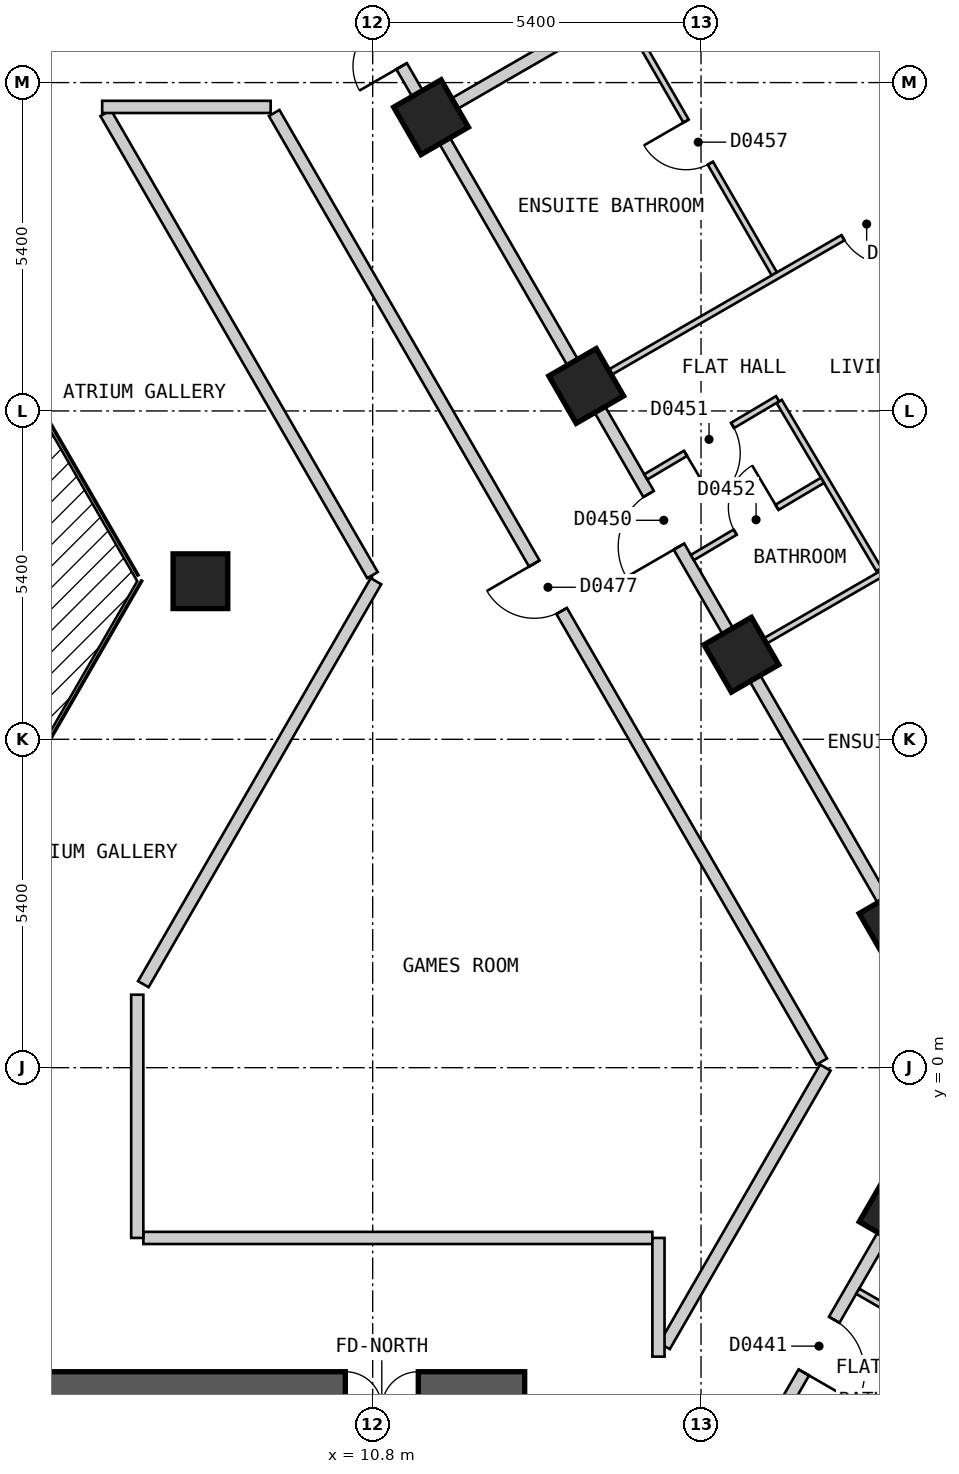
"""IFC4 building model, lengths in metres.
Left out: names, types, materials, properties, quantities, classifications, styles, units other than length and angle.
Written with IfcOpenShell. Run it as: python <this file> out.ifc"""

import sys

from ifc_helpers import new_model, si_unit, direction, frame, frame_2d, origin, origin_2d, place, context, subcontext, project, spatial, polyline, rectangle, outline, extrude, element, fill, save


model = new_model("IFC4")
c1 = context("Model", 3, precision=1e-05, world=origin(), true_north=direction((0.0, 1.0)))
c2 = subcontext(c1, "Body", "Model", "MODEL_VIEW")
j1 = project(units=[si_unit("LENGTHUNIT", "METRE"), si_unit("PLANEANGLEUNIT", "RADIAN")], contexts=[c1])
p1 = place(None, origin())
s1 = spatial("IfcSite", under=j1, at=p1, CompositionType="ELEMENT")
p2 = place(p1, origin())
s2 = spatial("IfcBuilding", under=s1, at=p2, CompositionType="ELEMENT")
p3 = place(p2, frame((0.0, 0.0, 26.4)))
s3 = spatial("IfcBuildingStorey", under=s2, at=p3, CompositionType="ELEMENT", Elevation=26.4)
for number, where, z_axis, x_axis in (
    (1, (19.417, -2.369, 0.0), (0.0, 0.0, 1.0), (0.5, 0.866, 0.0)),
    (2, (19.416, 2.371, 0.0), (0.0, 0.0, 1.0), (-0.5, 0.866, 0.0)),
    (3, (16.864, 6.791, 0.0), (0.0, 0.0, 1.0), (-0.5, 0.866, 0.0)),
    (4, (14.312, 11.211, 0.0), (0.0, 0.0, 1.0), (-0.5, 0.866, 0.0)),
    (5, (7.967, 8.0, 0.0), (0.0, 0.0, 1.0), (1.0, 0.0, 0.0)),
    (6, (11.76, 15.631, 0.0), (0.0, 0.0, 1.0), (-0.5, 0.866, 0.0)),
):
    element("IfcColumn", number, at=place(p3, frame(where, z_axis=z_axis, x_axis=x_axis)), inside=s3, PredefinedType="COLUMN", context=c2, shape_type="SweptSolid", body=[
        extrude(rectangle(XDim=0.9, YDim=0.9, at=origin_2d()), origin(), (0.0, 0.0, 1.0), 3.0),
    ])
p4 = place(p3, frame((-13.3, -5.6, 0.0), z_axis=(0.0, 0.0, 1.0), x_axis=(1.0, 0.0, 0.0)))
e7 = element("IfcWall", 7, at=p4, inside=s3, PredefinedType="SHEAR", context=c2, shape_type="SweptSolid", body=[
    extrude(rectangle(XDim=26.6, YDim=1.2, at=frame_2d((13.3, 0.0))), origin(), (0.0, 0.0, 1.0), 2.7),
])
p5 = place(p4, frame((23.65, 0.0, 0.0)))
e8 = element("IfcOpeningElement", 8, at=p5, cuts=e7, PredefinedType="OPENING", context=c2, shape_type="SweptSolid", body=[
    extrude(rectangle(XDim=1.2, YDim=2.1, at=frame_2d((0.6, 1.05))), frame((0.0, 0.61, 0.0), z_axis=(0.0, -1.0, 0.0), x_axis=(1.0, 0.0, 0.0)), (0.0, 0.0, 1.0), 1.22),
])
p6 = place(p3, frame((17.71, -25.825, 0.0), z_axis=(0.0, 0.0, 1.0), x_axis=(0.500001938803, 0.866024284413, 0.0)))
e9 = element("IfcWall", 9, at=p6, inside=s3, PredefinedType="SOLIDWALL", context=c2, shape_type="SweptSolid", body=[
    extrude(outline(polyline([(0.0, -0.15), (27.02, -0.15), (26.94, 0.15), (0.08, 0.15), (0.0, -0.15)])), origin(), (0.0, 0.0, 1.0), 2.7),
])
p7 = place(p6, frame((2.553, 0.0, 0.15)))
e10 = element("IfcOpeningElement", 10, at=p7, cuts=e9, PredefinedType="OPENING", context=c2, shape_type="SweptSolid", body=[
    extrude(rectangle(XDim=1.5, YDim=2.1, at=frame_2d((0.75, 1.05))), frame((0.0, 0.16, 0.0), z_axis=(0.0, -1.0, 0.0), x_axis=(1.0, 0.0, 0.0)), (0.0, 0.0, 1.0), 0.32),
])
p8 = place(p6, frame((7.658, 0.0, 0.15)))
e11 = element("IfcOpeningElement", 11, at=p8, cuts=e9, PredefinedType="OPENING", context=c2, shape_type="SweptSolid", body=[
    extrude(rectangle(XDim=1.5, YDim=2.1, at=frame_2d((0.75, 1.05))), frame((0.0, 0.16, 0.0), z_axis=(0.0, -1.0, 0.0), x_axis=(1.0, 0.0, 0.0)), (0.0, 0.0, 1.0), 0.32),
])
p9 = place(p6, frame((12.761, 0.0, 0.15)))
e12 = element("IfcOpeningElement", 12, at=p9, cuts=e9, PredefinedType="OPENING", context=c2, shape_type="SweptSolid", body=[
    extrude(rectangle(XDim=1.5, YDim=2.1, at=frame_2d((0.75, 1.05))), frame((0.0, 0.16, 0.0), z_axis=(0.0, -1.0, 0.0), x_axis=(1.0, 0.0, 0.0)), (0.0, 0.0, 1.0), 0.32),
])
p10 = place(p6, frame((17.865, 0.0, 0.15)))
e13 = element("IfcOpeningElement", 13, at=p10, cuts=e9, PredefinedType="OPENING", context=c2, shape_type="SweptSolid", body=[
    extrude(rectangle(XDim=1.5, YDim=2.1, at=frame_2d((0.75, 1.05))), frame((0.0, 0.16, 0.0), z_axis=(0.0, -1.0, 0.0), x_axis=(1.0, 0.0, 0.0)), (0.0, 0.0, 1.0), 0.32),
])
p11 = place(p6, frame((22.969, 0.0, 0.15)))
e14 = element("IfcOpeningElement", 14, at=p11, cuts=e9, PredefinedType="OPENING", context=c2, shape_type="SweptSolid", body=[
    extrude(rectangle(XDim=1.5, YDim=2.1, at=frame_2d((0.75, 1.05))), frame((0.0, 0.16, 0.0), z_axis=(0.0, -1.0, 0.0), x_axis=(1.0, 0.0, 0.0)), (0.0, 0.0, 1.0), 0.32),
])
p12 = place(p3, frame((31.22, 2.425, 0.0), z_axis=(0.0, 0.0, 1.0), x_axis=(-0.500001938803, 0.866024284413, 0.0)))
e15 = element("IfcWall", 15, at=p12, inside=s3, PredefinedType="SOLIDWALL", context=c2, shape_type="SweptSolid", body=[
    extrude(outline(polyline([(0.0, -0.15), (27.02, -0.15), (26.94, 0.15), (0.08, 0.15), (0.0, -0.15)])), origin(), (0.0, 0.0, 1.0), 2.7),
])
p13 = place(p12, frame((2.553, 0.0, 0.15)))
e16 = element("IfcOpeningElement", 16, at=p13, cuts=e15, PredefinedType="OPENING", context=c2, shape_type="SweptSolid", body=[
    extrude(rectangle(XDim=1.5, YDim=2.1, at=frame_2d((0.75, 1.05))), frame((0.0, 0.16, 0.0), z_axis=(0.0, -1.0, 0.0), x_axis=(1.0, 0.0, 0.0)), (0.0, 0.0, 1.0), 0.32),
])
p14 = place(p12, frame((7.657, 0.0, 0.15)))
e17 = element("IfcOpeningElement", 17, at=p14, cuts=e15, PredefinedType="OPENING", context=c2, shape_type="SweptSolid", body=[
    extrude(rectangle(XDim=1.5, YDim=2.1, at=frame_2d((0.75, 1.05))), frame((0.0, 0.16, 0.0), z_axis=(0.0, -1.0, 0.0), x_axis=(1.0, 0.0, 0.0)), (0.0, 0.0, 1.0), 0.32),
])
p15 = place(p12, frame((12.761, 0.0, 0.15)))
e18 = element("IfcOpeningElement", 18, at=p15, cuts=e15, PredefinedType="OPENING", context=c2, shape_type="SweptSolid", body=[
    extrude(rectangle(XDim=1.5, YDim=2.1, at=frame_2d((0.75, 1.05))), frame((0.0, 0.16, 0.0), z_axis=(0.0, -1.0, 0.0), x_axis=(1.0, 0.0, 0.0)), (0.0, 0.0, 1.0), 0.32),
])
p16 = place(p12, frame((17.865, 0.0, 0.15)))
e19 = element("IfcOpeningElement", 19, at=p16, cuts=e15, PredefinedType="OPENING", context=c2, shape_type="SweptSolid", body=[
    extrude(rectangle(XDim=1.5, YDim=2.1, at=frame_2d((0.75, 1.05))), frame((0.0, 0.16, 0.0), z_axis=(0.0, -1.0, 0.0), x_axis=(1.0, 0.0, 0.0)), (0.0, 0.0, 1.0), 0.32),
])
p17 = place(p12, frame((22.969, 0.0, 0.15)))
e20 = element("IfcOpeningElement", 20, at=p17, cuts=e15, PredefinedType="OPENING", context=c2, shape_type="SweptSolid", body=[
    extrude(rectangle(XDim=1.5, YDim=2.1, at=frame_2d((0.75, 1.05))), frame((0.0, 0.16, 0.0), z_axis=(0.0, -1.0, 0.0), x_axis=(1.0, 0.0, 0.0)), (0.0, 0.0, 1.0), 0.32),
])
p18 = place(p3, frame((6.409, 15.7, 0.0), z_axis=(0.0, 0.0, 1.0), x_axis=(0.499930377127, -0.866065596838, 0.0)))
e21 = element("IfcWall", 21, at=p18, inside=s3, PredefinedType="PARTITIONING", context=c2, shape_type="SweptSolid", body=[
    extrude(rectangle(XDim=8.775, YDim=0.2, at=frame_2d((4.388, 0.0))), origin(), (0.0, 0.0, 1.0), 2.7),
])
p19 = place(p3, frame((9.18, 15.7, 0.0), z_axis=(0.0, 0.0, 1.0), x_axis=(0.500003652032, -0.866023295272, 0.0)))
e22 = element("IfcWall", 22, at=p19, inside=s3, PredefinedType="PARTITIONING", context=c2, shape_type="SweptSolid", body=[
    extrude(rectangle(XDim=18.012, YDim=0.2, at=frame_2d((9.006, 0.0))), origin(), (0.0, 0.0, 1.0), 2.7),
])
p20 = place(p19, frame((8.556, 0.0, 0.0)))
e23 = element("IfcOpeningElement", 23, at=p20, cuts=e22, PredefinedType="OPENING", context=c2, shape_type="SweptSolid", body=[
    extrude(rectangle(XDim=0.9, YDim=2.1, at=frame_2d((0.45, 1.05))), frame((0.0, 0.11, 0.0), z_axis=(0.0, -1.0, 0.0), x_axis=(1.0, 0.0, 0.0)), (0.0, 0.0, 1.0), 0.22),
])
p21 = place(p3, frame((10.45, 17.9, 0.0), z_axis=(0.0, 0.0, 1.0), x_axis=(0.500034352617, -0.866005569383, 0.0)))
e24 = element("IfcWall", 24, at=p21, inside=s3, PredefinedType="PARTITIONING", context=c2, shape_type="SweptSolid", body=[
    extrude(rectangle(XDim=20.553, YDim=0.2, at=frame_2d((10.276, 0.0))), origin(), (0.0, 0.0, 1.0), 2.7),
])
p22 = place(p21, frame((9.775, 0.0, 0.0)))
e25 = element("IfcOpeningElement", 25, at=p22, cuts=e24, PredefinedType="OPENING", context=c2, shape_type="SweptSolid", body=[
    extrude(rectangle(XDim=1.0, YDim=2.1, at=frame_2d((0.5, 1.05))), frame((0.0, 0.11, 0.0), z_axis=(0.0, -1.0, 0.0), x_axis=(1.0, 0.0, 0.0)), (0.0, 0.0, 1.0), 0.22),
])
p23 = place(p21, frame((0.852, 0.0, 0.0)))
e26 = element("IfcOpeningElement", 26, at=p23, cuts=e24, PredefinedType="OPENING", context=c2, shape_type="SweptSolid", body=[
    extrude(rectangle(XDim=0.8, YDim=2.1, at=frame_2d((0.4, 1.05))), frame((0.0, 0.11, 0.0), z_axis=(0.0, -1.0, 0.0), x_axis=(1.0, 0.0, 0.0)), (0.0, 0.0, 1.0), 0.22),
])
p24 = place(p3, frame((7.028, -2.8, 0.0), z_axis=(0.0, 0.0, 1.0), x_axis=(1.0, 0.0, 0.0)))
e27 = element("IfcWall", 27, at=p24, inside=s3, PredefinedType="PARTITIONING", context=c2, shape_type="SweptSolid", body=[
    extrude(rectangle(XDim=8.372, YDim=0.2, at=frame_2d((4.186, 0.0))), origin(), (0.0, 0.0, 1.0), 2.7),
])
p25 = place(p3, frame((6.351, 15.8, 0.0), z_axis=(0.0, 0.0, 1.0), x_axis=(1.0, 0.0, 0.0)))
e28 = element("IfcWall", 28, at=p25, inside=s3, PredefinedType="PARTITIONING", context=c2, shape_type="SweptSolid", body=[
    extrude(rectangle(XDim=2.771, YDim=0.2, at=frame_2d((1.385, 0.0))), origin(), (0.0, 0.0, 1.0), 2.7),
])
p26 = place(p3, frame((7.028, 1.373, 0.0), z_axis=(0.0, 0.0, 1.0), x_axis=(0.49998574534, 0.86603363356, 0.0)))
e29 = element("IfcWall", 29, at=p26, inside=s3, PredefinedType="PARTITIONING", context=c2, shape_type="SweptSolid", body=[
    extrude(rectangle(XDim=7.652, YDim=0.2, at=frame_2d((3.826, 0.0))), origin(), (0.0, 0.0, 1.0), 2.7),
])
p27 = place(p3, frame((15.6, -4.579, 0.0), z_axis=(0.0, 0.0, 1.0), x_axis=(0.499927597274, 0.866067201483, 0.0)))
e30 = element("IfcWall", 30, at=p27, inside=s3, PredefinedType="PARTITIONING", context=c2, shape_type="SweptSolid", body=[
    extrude(rectangle(XDim=5.288, YDim=0.2, at=frame_2d((2.644, 0.0))), origin(), (0.0, 0.0, 1.0), 2.7),
])
p28 = place(p3, frame((15.707, -8.794, 0.0), z_axis=(0.0, 0.0, 1.0), x_axis=(0.500016151272, 0.866016078642, 0.0)))
e31 = element("IfcWall", 31, at=p28, inside=s3, PredefinedType="PARTITIONING", context=c2, shape_type="SweptSolid", body=[
    extrude(rectangle(XDim=10.098, YDim=0.2, at=frame_2d((5.049, 0.0))), origin(), (0.0, 0.0, 1.0), 2.7),
])
p29 = place(p28, frame((4.367, 0.0, 0.0)))
e32 = element("IfcOpeningElement", 32, at=p29, cuts=e31, PredefinedType="OPENING", context=c2, shape_type="SweptSolid", body=[
    extrude(rectangle(XDim=1.0, YDim=2.1, at=frame_2d((0.5, 1.05))), frame((0.0, 0.11, 0.0), z_axis=(0.0, -1.0, 0.0), x_axis=(1.0, 0.0, 0.0)), (0.0, 0.0, 1.0), 0.22),
])
p30 = place(p3, frame((6.928, -2.8, 0.0), z_axis=(0.0, 0.0, 1.0), x_axis=(0.0, 1.0, 0.0)))
e33 = element("IfcWall", 33, at=p30, inside=s3, PredefinedType="PARTITIONING", context=c2, shape_type="SweptSolid", body=[
    extrude(rectangle(XDim=4.0, YDim=0.2, at=frame_2d((2.0, 0.0))), origin(), (0.0, 0.0, 1.0), 2.7),
])
p31 = place(p3, frame((15.5, -4.752, 0.0), z_axis=(0.0, 0.0, 1.0), x_axis=(0.0, 1.0, 0.0)))
e34 = element("IfcWall", 34, at=p31, inside=s3, PredefinedType="PARTITIONING", context=c2, shape_type="SweptSolid", body=[
    extrude(rectangle(XDim=1.952, YDim=0.2, at=frame_2d((0.976, 0.0))), origin(), (0.0, 0.0, 1.0), 2.7),
])
p32 = place(p3, frame((17.485, 10.957, 0.0), z_axis=(0.0, 0.0, 1.0), x_axis=(0.510324709283, -0.859981796956, 0.0)))
e35 = element("IfcWall", 35, at=p32, inside=s3, PredefinedType="PARTITIONING", context=c2, shape_type="SweptSolid", body=[
    extrude(rectangle(XDim=3.215, YDim=0.1, at=frame_2d((1.608, 0.0))), origin(), (0.0, 0.0, 1.0), 2.7),
])
p33 = place(p3, frame((14.928, 17.344, 0.0), z_axis=(0.0, 0.0, 1.0), x_axis=(0.500029609304, -0.86600830817, 0.0)))
e36 = element("IfcWall", 36, at=p33, inside=s3, PredefinedType="PARTITIONING", context=c2, shape_type="SweptSolid", body=[
    extrude(rectangle(XDim=4.954, YDim=0.1, at=frame_2d((2.477, 0.0))), origin(), (0.0, 0.0, 1.0), 2.7),
])
p34 = place(p33, frame((2.052, 0.0, 0.0)))
e37 = element("IfcOpeningElement", 37, at=p34, cuts=e36, PredefinedType="OPENING", context=c2, shape_type="SweptSolid", body=[
    extrude(rectangle(XDim=0.8, YDim=2.1, at=frame_2d((0.4, 1.05))), frame((0.0, 0.06, 0.0), z_axis=(0.0, -1.0, 0.0), x_axis=(1.0, 0.0, 0.0)), (0.0, 0.0, 1.0), 0.12),
])
p35 = place(p3, frame((18.777, -3.677, 0.0), z_axis=(0.0, 0.0, 1.0), x_axis=(0.866000843773, -0.500042536776, 0.0)))
e38 = element("IfcWall", 38, at=p35, inside=s3, PredefinedType="PARTITIONING", context=c2, shape_type="SweptSolid", body=[
    extrude(rectangle(XDim=4.05, YDim=0.1, at=frame_2d((2.025, 0.0))), origin(), (0.0, 0.0, 1.0), 2.7),
])
p36 = place(p35, frame((1.55, 0.0, 0.0)))
e39 = element("IfcOpeningElement", 39, at=p36, cuts=e38, PredefinedType="OPENING", context=c2, shape_type="SweptSolid", body=[
    extrude(rectangle(XDim=0.9, YDim=2.1, at=frame_2d((0.45, 1.05))), frame((0.0, 0.06, 0.0), z_axis=(0.0, -1.0, 0.0), x_axis=(1.0, 0.0, 0.0)), (0.0, 0.0, 1.0), 0.12),
])
p37 = place(p3, frame((16.95, 6.841, 0.0), z_axis=(0.0, 0.0, 1.0), x_axis=(0.866022959057, 0.500004234368, 0.0)))
e40 = element("IfcWall", 40, at=p37, inside=s3, PredefinedType="PARTITIONING", context=c2, shape_type="SweptSolid", body=[
    extrude(rectangle(XDim=10.0, YDim=0.1, at=frame_2d((5.0, 0.0))), origin(), (0.0, 0.0, 1.0), 2.7),
])
p38 = place(p37, frame((4.795, 0.0, 0.0)))
e41 = element("IfcOpeningElement", 41, at=p38, cuts=e40, PredefinedType="OPENING", context=c2, shape_type="SweptSolid", body=[
    extrude(rectangle(XDim=0.9, YDim=2.1, at=frame_2d((0.45, 1.05))), frame((0.0, 0.06, 0.0), z_axis=(0.0, -1.0, 0.0), x_axis=(1.0, 0.0, 0.0)), (0.0, 0.0, 1.0), 0.12),
])
p39 = place(p3, frame((14.399, 11.261, 0.0), z_axis=(0.0, 0.0, 1.0), x_axis=(0.866022959057, 0.500004234368, 0.0)))
e42 = element("IfcWall", 42, at=p39, inside=s3, PredefinedType="PARTITIONING", context=c2, shape_type="SweptSolid", body=[
    extrude(rectangle(XDim=10.0, YDim=0.1, at=frame_2d((5.0, 0.0))), origin(), (0.0, 0.0, 1.0), 2.7),
])
p40 = place(p39, frame((4.775, 0.0, 0.0)))
e43 = element("IfcOpeningElement", 43, at=p40, cuts=e42, PredefinedType="OPENING", context=c2, shape_type="SweptSolid", body=[
    extrude(rectangle(XDim=0.9, YDim=2.1, at=frame_2d((0.45, 1.05))), frame((0.0, 0.06, 0.0), z_axis=(0.0, -1.0, 0.0), x_axis=(1.0, 0.0, 0.0)), (0.0, 0.0, 1.0), 0.12),
])
p41 = place(p3, frame((16.057, 8.389, 0.0), z_axis=(0.0, 0.0, 1.0), x_axis=(0.860077993161, 0.510162567893, 0.0)))
e44 = element("IfcWall", 44, at=p41, inside=s3, PredefinedType="PARTITIONING", context=c2, shape_type="SweptSolid", body=[
    extrude(rectangle(XDim=2.49, YDim=0.1, at=frame_2d((1.245, 0.0))), origin(), (0.0, 0.0, 1.0), 2.7),
])
p42 = place(p41, frame((0.819, 0.0, 0.0)))
e45 = element("IfcOpeningElement", 45, at=p42, cuts=e44, PredefinedType="OPENING", context=c2, shape_type="SweptSolid", body=[
    extrude(rectangle(XDim=0.8, YDim=2.1, at=frame_2d((0.4, 1.05))), frame((0.0, 0.06, 0.0), z_axis=(0.0, -1.0, 0.0), x_axis=(1.0, 0.0, 0.0)), (0.0, 0.0, 1.0), 0.12),
])
p43 = place(p3, frame((15.291, 9.715, 0.0), z_axis=(0.0, 0.0, 1.0), x_axis=(0.860088508644, 0.51014483953, 0.0)))
e46 = element("IfcWall", 46, at=p43, inside=s3, PredefinedType="PARTITIONING", context=c2, shape_type="SweptSolid", body=[
    extrude(rectangle(XDim=2.521, YDim=0.1, at=frame_2d((1.26, 0.0))), origin(), (0.0, 0.0, 1.0), 2.7),
])
p44 = place(p43, frame((0.76, 0.0, 0.0)))
e47 = element("IfcOpeningElement", 47, at=p44, cuts=e46, PredefinedType="OPENING", context=c2, shape_type="SweptSolid", body=[
    extrude(rectangle(XDim=0.9, YDim=2.1, at=frame_2d((0.45, 1.05))), frame((0.0, 0.06, 0.0), z_axis=(0.0, -1.0, 0.0), x_axis=(1.0, 0.0, 0.0)), (0.0, 0.0, 1.0), 0.12),
])
p45 = place(p3, frame((11.847, 15.681, 0.0), z_axis=(0.0, 0.0, 1.0), x_axis=(0.866022959057, 0.500004234368, 0.0)))
e48 = element("IfcWall", 48, at=p45, inside=s3, PredefinedType="PARTITIONING", context=c2, shape_type="SweptSolid", body=[
    extrude(rectangle(XDim=10.0, YDim=0.2, at=frame_2d((5.0, 0.0))), origin(), (0.0, 0.0, 1.0), 2.7),
])
p46 = place(p29, origin())
e49 = element("IfcDoor", 49, at=p46, inside=s3, OperationType="SINGLE_SWING_LEFT", PredefinedType="DOOR", context=c2, shape_type="SweptSolid", body=[
    extrude(rectangle(XDim=1.0, YDim=2.1, at=frame_2d((0.5, 1.05))), frame((0.0, 0.025, 0.0), z_axis=(0.0, -1.0, 0.0), x_axis=(1.0, 0.0, 0.0)), (0.0, 0.0, 1.0), 0.05),
])
fill(e32, e49)
p47 = place(p22, origin())
e50 = element("IfcDoor", 50, at=p47, inside=s3, OperationType="SINGLE_SWING_RIGHT", PredefinedType="DOOR", context=c2, shape_type="SweptSolid", body=[
    extrude(rectangle(XDim=1.0, YDim=2.1, at=frame_2d((0.5, 1.05))), frame((0.0, 0.025, 0.0), z_axis=(0.0, -1.0, 0.0), x_axis=(1.0, 0.0, 0.0)), (0.0, 0.0, 1.0), 0.05),
])
fill(e25, e50)
p48 = place(p44, origin())
e51 = element("IfcDoor", 51, at=p48, inside=s3, OperationType="SINGLE_SWING_LEFT", PredefinedType="DOOR", context=c2, shape_type="SweptSolid", body=[
    extrude(rectangle(XDim=0.9, YDim=2.1, at=frame_2d((0.45, 1.05))), frame((0.0, 0.025, 0.0), z_axis=(0.0, -1.0, 0.0), x_axis=(1.0, 0.0, 0.0)), (0.0, 0.0, 1.0), 0.05),
])
fill(e47, e51)
p49 = place(p42, origin())
e52 = element("IfcDoor", 52, at=p49, inside=s3, OperationType="SINGLE_SWING_RIGHT", PredefinedType="DOOR", context=c2, shape_type="SweptSolid", body=[
    extrude(rectangle(XDim=0.8, YDim=2.1, at=frame_2d((0.4, 1.05))), frame((0.0, 0.025, 0.0), z_axis=(0.0, -1.0, 0.0), x_axis=(1.0, 0.0, 0.0)), (0.0, 0.0, 1.0), 0.05),
])
fill(e45, e52)
p50 = place(p40, origin())
e53 = element("IfcDoor", 53, at=p50, inside=s3, OperationType="SINGLE_SWING_RIGHT", PredefinedType="DOOR", context=c2, shape_type="SweptSolid", body=[
    extrude(rectangle(XDim=0.9, YDim=2.1, at=frame_2d((0.45, 1.05))), frame((0.0, 0.025, 0.0), z_axis=(0.0, -1.0, 0.0), x_axis=(1.0, 0.0, 0.0)), (0.0, 0.0, 1.0), 0.05),
])
fill(e43, e53)
p51 = place(p34, origin())
e54 = element("IfcDoor", 54, at=p51, inside=s3, OperationType="SINGLE_SWING_LEFT", PredefinedType="DOOR", context=c2, shape_type="SweptSolid", body=[
    extrude(rectangle(XDim=0.8, YDim=2.1, at=frame_2d((0.4, 1.05))), frame((0.0, 0.025, 0.0), z_axis=(0.0, -1.0, 0.0), x_axis=(1.0, 0.0, 0.0)), (0.0, 0.0, 1.0), 0.05),
])
fill(e37, e54)
p52 = place(p23, origin())
e55 = element("IfcDoor", 55, at=p52, inside=s3, OperationType="SINGLE_SWING_RIGHT", PredefinedType="DOOR", context=c2, shape_type="SweptSolid", body=[
    extrude(rectangle(XDim=0.8, YDim=2.1, at=frame_2d((0.4, 1.05))), frame((0.0, 0.025, 0.0), z_axis=(0.0, -1.0, 0.0), x_axis=(1.0, 0.0, 0.0)), (0.0, 0.0, 1.0), 0.05),
])
fill(e26, e55)
p53 = place(p20, origin())
e56 = element("IfcDoor", 56, at=p53, inside=s3, OperationType="SINGLE_SWING_LEFT", PredefinedType="DOOR", context=c2, shape_type="SweptSolid", body=[
    extrude(rectangle(XDim=0.9, YDim=2.1, at=frame_2d((0.45, 1.05))), frame((0.0, 0.025, 0.0), z_axis=(0.0, -1.0, 0.0), x_axis=(1.0, 0.0, 0.0)), (0.0, 0.0, 1.0), 0.05),
])
fill(e23, e56)
save(model, sys.argv[1])
